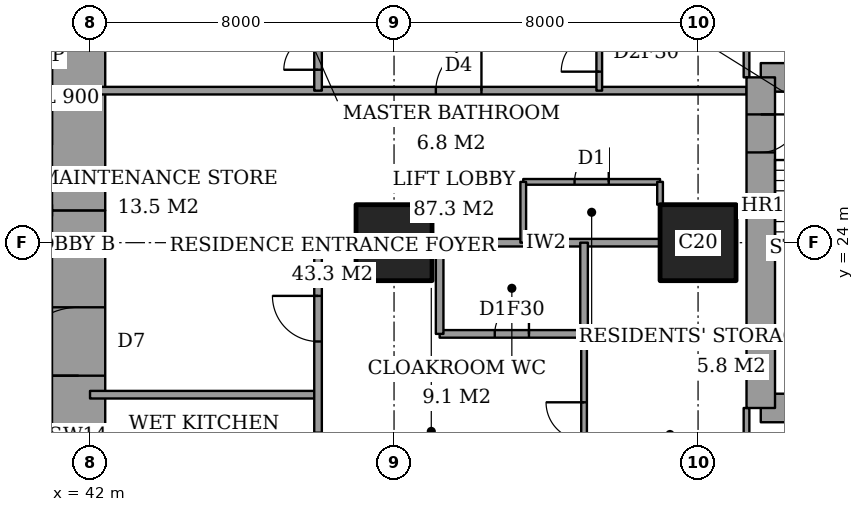
"""IFC4 building model, lengths in metres.
Left out: names, types, materials, properties, quantities, classifications, styles, units other than length and angle.
Written with IfcOpenShell. Run it as: python <this file> out.ifc"""

import sys

from ifc_helpers import new_model, si_unit, direction, frame, frame_2d, origin, origin_2d, place, context, subcontext, project, spatial, rectangle, extrude, element, fill, save


model = new_model("IFC4")
c1 = context("Model", 3, precision=1e-05, world=origin(), true_north=direction((0.0, 1.0)))
c2 = subcontext(c1, "Body", "Model", "MODEL_VIEW")
j1 = project(units=[si_unit("LENGTHUNIT", "METRE"), si_unit("PLANEANGLEUNIT", "RADIAN")], contexts=[c1])
p1 = place(None, origin())
s1 = spatial("IfcSite", under=j1, at=p1, CompositionType="ELEMENT")
p2 = place(p1, origin())
s2 = spatial("IfcBuilding", under=s1, at=p2, CompositionType="ELEMENT")
p3 = place(p2, frame((0.0, 0.0, 58.4)))
s3 = spatial("IfcBuildingStorey", under=s2, at=p3, CompositionType="ELEMENT", Elevation=58.4)
for number, where, z_axis, x_axis in (
    (1, (50.0, 24.0, 0.0), (0.0, 0.0, 1.0), (1.0, 0.0, 0.0)),
    (2, (58.0, 24.0, 0.0), (0.0, 0.0, 1.0), (1.0, 0.0, 0.0)),
):
    element("IfcColumn", number, at=place(p3, frame(where, z_axis=z_axis, x_axis=x_axis)), inside=s3, PredefinedType="COLUMN", context=c2, shape_type="SweptSolid", body=[
        extrude(rectangle(XDim=2.0, YDim=2.0, at=origin_2d()), origin(), (0.0, 0.0, 1.0), 3.6),
    ])
p4 = place(p3, frame((41.7, 13.0, 0.0), z_axis=(0.0, 0.0, 1.0), x_axis=(0.0, 1.0, 0.0)))
e3 = element("IfcWall", 3, at=p4, inside=s3, PredefinedType="SHEAR", context=c2, shape_type="SweptSolid", body=[
    extrude(rectangle(XDim=11.85, YDim=1.4, at=frame_2d((5.925, 0.0))), origin(), (0.0, 0.0, 1.0), 3.6),
])
p5 = place(p4, frame((7.5, 0.0, 0.0)))
e4 = element("IfcOpeningElement", 4, at=p5, cuts=e3, PredefinedType="OPENING", context=c2, shape_type="SweptSolid", body=[
    extrude(rectangle(XDim=1.8, YDim=2.4, at=frame_2d((0.9, 1.2))), frame((0.0, 0.71, 0.0), z_axis=(0.0, -1.0, 0.0), x_axis=(1.0, 0.0, 0.0)), (0.0, 0.0, 1.0), 1.42),
])
p6 = place(p3, frame((41.7, 24.85, 0.0), z_axis=(0.0, 0.0, 1.0), x_axis=(0.0, 1.0, 0.0)))
e5 = element("IfcWall", 5, at=p6, inside=s3, PredefinedType="SHEAR", context=c2, shape_type="SweptSolid", body=[
    extrude(rectangle(XDim=10.15, YDim=1.4, at=frame_2d((5.075, 0.0))), origin(), (0.0, 0.0, 1.0), 3.6),
])
for number, where, z_axis, x_axis in (
    (6, (59.65, 19.65, 0.0), (0.0, 0.0, 1.0), (1.0, 0.0, 0.0)),
    (7, (64.1, 28.35, 0.0), (0.0, 0.0, 1.0), (-1.0, 0.0, 0.0)),
):
    element("IfcWall", number, at=place(p3, frame(where, z_axis=z_axis, x_axis=x_axis)), inside=s3, PredefinedType="SHEAR", context=c2, shape_type="SweptSolid", body=[
        extrude(rectangle(XDim=4.45, YDim=0.75, at=frame_2d((2.225, 0.0))), origin(), (0.0, 0.0, 1.0), 3.6),
    ])
p7 = place(p3, frame((59.65, 28.35, 0.0), z_axis=(0.0, 0.0, 1.0), x_axis=(0.0, -1.0, 0.0)))
e8 = element("IfcWall", 8, at=p7, inside=s3, PredefinedType="SHEAR", context=c2, shape_type="SweptSolid", body=[
    extrude(rectangle(XDim=8.7, YDim=0.75, at=frame_2d((4.35, 0.0))), origin(), (0.0, 0.0, 1.0), 3.6),
])
p8 = place(p7, frame((0.975, 0.0, 0.0)))
e9 = element("IfcOpeningElement", 9, at=p8, cuts=e8, PredefinedType="OPENING", context=c2, shape_type="SweptSolid", body=[
    extrude(rectangle(XDim=1.0, YDim=2.1, at=frame_2d((0.5, 1.05))), frame((0.0, 0.385, 0.0), z_axis=(0.0, -1.0, 0.0), x_axis=(1.0, 0.0, 0.0)), (0.0, 0.0, 1.0), 0.77),
])
p9 = place(p3, frame((42.0, 20.0, 0.0), z_axis=(0.0, 0.0, 1.0), x_axis=(1.0, 0.0, 0.0)))
e10 = element("IfcWall", 10, at=p9, inside=s3, PredefinedType="PARTITIONING", context=c2, shape_type="SweptSolid", body=[
    extrude(rectangle(XDim=6.0, YDim=0.2, at=frame_2d((3.0, 0.0))), origin(), (0.0, 0.0, 1.0), 3.35),
])
p10 = place(p3, frame((51.2, 21.6, 0.0), z_axis=(0.0, 0.0, 1.0), x_axis=(1.0, 0.0, 0.0)))
e11 = element("IfcWall", 11, at=p10, inside=s3, PredefinedType="PARTITIONING", context=c2, shape_type="SweptSolid", body=[
    extrude(rectangle(XDim=3.8, YDim=0.2, at=frame_2d((1.9, 0.0))), origin(), (0.0, 0.0, 1.0), 3.35),
])
p11 = place(p10, frame((1.45, 0.0, 0.0)))
e12 = element("IfcOpeningElement", 12, at=p11, cuts=e11, PredefinedType="OPENING", context=c2, shape_type="SweptSolid", body=[
    extrude(rectangle(XDim=0.9, YDim=2.1, at=frame_2d((0.45, 1.05))), frame((0.0, 0.11, 0.0), z_axis=(0.0, -1.0, 0.0), x_axis=(1.0, 0.0, 0.0)), (0.0, 0.0, 1.0), 0.22),
])
p12 = place(p3, frame((48.0, 24.0, 0.0), z_axis=(0.0, 0.0, 1.0), x_axis=(1.0, 0.0, 0.0)))
e13 = element("IfcWall", 13, at=p12, inside=s3, PredefinedType="PARTITIONING", context=c2, shape_type="SweptSolid", body=[
    extrude(rectangle(XDim=1.0, YDim=0.2, at=frame_2d((0.5, 0.0))), origin(), (0.0, 0.0, 1.0), 3.35),
])
p13 = place(p3, frame((51.0, 24.0, 0.0), z_axis=(0.0, 0.0, 1.0), x_axis=(1.0, 0.0, 0.0)))
e14 = element("IfcWall", 14, at=p13, inside=s3, PredefinedType="PARTITIONING", context=c2, shape_type="SweptSolid", body=[
    extrude(rectangle(XDim=6.0, YDim=0.2, at=frame_2d((3.0, 0.0))), origin(), (0.0, 0.0, 1.0), 3.35),
])
p14 = place(p3, frame((53.4, 25.6, 0.0), z_axis=(0.0, 0.0, 1.0), x_axis=(1.0, 0.0, 0.0)))
e15 = element("IfcWall", 15, at=p14, inside=s3, PredefinedType="PARTITIONING", context=c2, shape_type="SweptSolid", body=[
    extrude(rectangle(XDim=3.6, YDim=0.15, at=frame_2d((1.8, 0.0))), origin(), (0.0, 0.0, 1.0), 3.35),
])
p15 = place(p14, frame((1.35, 0.0, 0.0)))
e16 = element("IfcOpeningElement", 16, at=p15, cuts=e15, PredefinedType="OPENING", context=c2, shape_type="SweptSolid", body=[
    extrude(rectangle(XDim=0.9, YDim=2.1, at=frame_2d((0.45, 1.05))), frame((0.0, 0.085, 0.0), z_axis=(0.0, -1.0, 0.0), x_axis=(1.0, 0.0, 0.0)), (0.0, 0.0, 1.0), 0.17),
])
p16 = place(p3, frame((42.0, 28.0, 0.0), z_axis=(0.0, 0.0, 1.0), x_axis=(1.0, 0.0, 0.0)))
e17 = element("IfcWall", 17, at=p16, inside=s3, PredefinedType="PARTITIONING", context=c2, shape_type="SweptSolid", body=[
    extrude(rectangle(XDim=17.275, YDim=0.2, at=frame_2d((8.637, 0.0))), origin(), (0.0, 0.0, 1.0), 3.35),
])
p17 = place(p16, frame((9.1, 0.0, 0.0)))
e18 = element("IfcOpeningElement", 18, at=p17, cuts=e17, PredefinedType="OPENING", context=c2, shape_type="SweptSolid", body=[
    extrude(rectangle(XDim=1.2, YDim=2.4, at=frame_2d((0.6, 1.2))), frame((0.0, 0.11, 0.0), z_axis=(0.0, -1.0, 0.0), x_axis=(1.0, 0.0, 0.0)), (0.0, 0.0, 1.0), 0.22),
])
p18 = place(p3, frame((48.0, 17.0, 0.0), z_axis=(0.0, 0.0, 1.0), x_axis=(0.0, 1.0, 0.0)))
e19 = element("IfcWall", 19, at=p18, inside=s3, PredefinedType="PARTITIONING", context=c2, shape_type="SweptSolid", body=[
    extrude(rectangle(XDim=7.0, YDim=0.2, at=frame_2d((3.5, 0.0))), origin(), (0.0, 0.0, 1.0), 3.35),
])
p19 = place(p18, frame((4.4, 0.0, 0.0)))
e20 = element("IfcOpeningElement", 20, at=p19, cuts=e19, PredefinedType="OPENING", context=c2, shape_type="SweptSolid", body=[
    extrude(rectangle(XDim=1.2, YDim=2.4, at=frame_2d((0.6, 1.2))), frame((0.0, 0.11, 0.0), z_axis=(0.0, -1.0, 0.0), x_axis=(1.0, 0.0, 0.0)), (0.0, 0.0, 1.0), 0.22),
])
p20 = place(p18, frame((1.0, 0.0, 0.0)))
e21 = element("IfcOpeningElement", 21, at=p20, cuts=e19, PredefinedType="OPENING", context=c2, shape_type="SweptSolid", body=[
    extrude(rectangle(XDim=1.0, YDim=2.1, at=frame_2d((0.5, 1.05))), frame((0.0, 0.11, 0.0), z_axis=(0.0, -1.0, 0.0), x_axis=(1.0, 0.0, 0.0)), (0.0, 0.0, 1.0), 0.22),
])
p21 = place(p3, frame((48.0, 28.0, 0.0), z_axis=(0.0, 0.0, 1.0), x_axis=(0.0, 1.0, 0.0)))
e22 = element("IfcWall", 22, at=p21, inside=s3, PredefinedType="PARTITIONING", context=c2, shape_type="SweptSolid", body=[
    extrude(rectangle(XDim=2.5, YDim=0.2, at=frame_2d((1.25, 0.0))), origin(), (0.0, 0.0, 1.0), 3.35),
])
p22 = place(p21, frame((0.55, 0.0, 0.0)))
e23 = element("IfcOpeningElement", 23, at=p22, cuts=e22, PredefinedType="OPENING", context=c2, shape_type="SweptSolid", body=[
    extrude(rectangle(XDim=0.9, YDim=2.1, at=frame_2d((0.45, 1.05))), frame((0.0, 0.11, 0.0), z_axis=(0.0, -1.0, 0.0), x_axis=(1.0, 0.0, 0.0)), (0.0, 0.0, 1.0), 0.22),
])
p23 = place(p3, frame((51.2, 21.6, 0.0), z_axis=(0.0, 0.0, 1.0), x_axis=(0.0, 1.0, 0.0)))
e24 = element("IfcWall", 24, at=p23, inside=s3, PredefinedType="PARTITIONING", context=c2, shape_type="SweptSolid", body=[
    extrude(rectangle(XDim=2.4, YDim=0.2, at=frame_2d((1.2, 0.0))), origin(), (0.0, 0.0, 1.0), 3.35),
])
p24 = place(p3, frame((53.4, 24.0, 0.0), z_axis=(0.0, 0.0, 1.0), x_axis=(0.0, 1.0, 0.0)))
e25 = element("IfcWall", 25, at=p24, inside=s3, PredefinedType="PARTITIONING", context=c2, shape_type="SweptSolid", body=[
    extrude(rectangle(XDim=1.6, YDim=0.15, at=frame_2d((0.8, 0.0))), origin(), (0.0, 0.0, 1.0), 3.35),
])
p25 = place(p3, frame((55.0, 21.6, 0.0), z_axis=(0.0, 0.0, 1.0), x_axis=(0.0, 1.0, 0.0)))
e26 = element("IfcWall", 26, at=p25, inside=s3, PredefinedType="PARTITIONING", context=c2, shape_type="SweptSolid", body=[
    extrude(rectangle(XDim=2.4, YDim=0.2, at=frame_2d((1.2, 0.0))), origin(), (0.0, 0.0, 1.0), 3.35),
])
p26 = place(p3, frame((55.0, 10.6, 0.0), z_axis=(0.0, 0.0, 1.0), x_axis=(0.0, 1.0, 0.0)))
e27 = element("IfcWall", 27, at=p26, inside=s3, PredefinedType="PARTITIONING", context=c2, shape_type="SweptSolid", body=[
    extrude(rectangle(XDim=11.0, YDim=0.15, at=frame_2d((5.5, 0.0))), origin(), (0.0, 0.0, 1.0), 3.35),
])
p27 = place(p26, frame((8.2, 0.0, 0.0)))
e28 = element("IfcOpeningElement", 28, at=p27, cuts=e27, PredefinedType="OPENING", context=c2, shape_type="SweptSolid", body=[
    extrude(rectangle(XDim=1.0, YDim=2.1, at=frame_2d((0.5, 1.05))), frame((0.0, 0.085, 0.0), z_axis=(0.0, -1.0, 0.0), x_axis=(1.0, 0.0, 0.0)), (0.0, 0.0, 1.0), 0.17),
])
p28 = place(p3, frame((55.4, 28.0, 0.0), z_axis=(0.0, 0.0, 1.0), x_axis=(0.0, 1.0, 0.0)))
e29 = element("IfcWall", 29, at=p28, inside=s3, PredefinedType="PARTITIONING", context=c2, shape_type="SweptSolid", body=[
    extrude(rectangle(XDim=9.2, YDim=0.15, at=frame_2d((4.6, 0.0))), origin(), (0.0, 0.0, 1.0), 3.35),
])
p29 = place(p28, frame((0.5, 0.0, 0.0)))
e30 = element("IfcOpeningElement", 30, at=p29, cuts=e29, PredefinedType="OPENING", context=c2, shape_type="SweptSolid", body=[
    extrude(rectangle(XDim=1.0, YDim=2.1, at=frame_2d((0.5, 1.05))), frame((0.0, 0.085, 0.0), z_axis=(0.0, -1.0, 0.0), x_axis=(1.0, 0.0, 0.0)), (0.0, 0.0, 1.0), 0.17),
])
p30 = place(p3, frame((57.0, 25.0, 0.0), z_axis=(0.0, 0.0, 1.0), x_axis=(0.0, 1.0, 0.0)))
e31 = element("IfcWall", 31, at=p30, inside=s3, PredefinedType="PARTITIONING", context=c2, shape_type="SweptSolid", body=[
    extrude(rectangle(XDim=0.6, YDim=0.15, at=frame_2d((0.3, 0.0))), origin(), (0.0, 0.0, 1.0), 3.35),
])
p31 = place(p3, frame((59.275, 17.2, 0.0), z_axis=(0.0, 0.0, 1.0), x_axis=(0.0, 1.0, 0.0)))
e32 = element("IfcWall", 32, at=p31, inside=s3, PredefinedType="PARTITIONING", context=c2, shape_type="SweptSolid", body=[
    extrude(rectangle(XDim=2.45, YDim=0.15, at=frame_2d((1.225, 0.0))), origin(), (0.0, 0.0, 1.0), 3.35),
])
p32 = place(p31, frame((0.538, 0.0, 0.0)))
e33 = element("IfcOpeningElement", 33, at=p32, cuts=e32, PredefinedType="OPENING", context=c2, shape_type="SweptSolid", body=[
    extrude(rectangle(XDim=1.0, YDim=2.1, at=frame_2d((0.5, 1.05))), frame((0.0, 0.085, 0.0), z_axis=(0.0, -1.0, 0.0), x_axis=(1.0, 0.0, 0.0)), (0.0, 0.0, 1.0), 0.17),
])
p33 = place(p3, frame((59.275, 28.35, 0.0), z_axis=(0.0, 0.0, 1.0), x_axis=(0.0, 1.0, 0.0)))
e34 = element("IfcWall", 34, at=p33, inside=s3, PredefinedType="PARTITIONING", context=c2, shape_type="SweptSolid", body=[
    extrude(rectangle(XDim=2.45, YDim=0.15, at=frame_2d((1.225, 0.0))), origin(), (0.0, 0.0, 1.0), 3.35),
])
p34 = place(p33, frame((0.962, 0.0, 0.0)))
e35 = element("IfcOpeningElement", 35, at=p34, cuts=e34, PredefinedType="OPENING", context=c2, shape_type="SweptSolid", body=[
    extrude(rectangle(XDim=0.9, YDim=2.1, at=frame_2d((0.45, 1.05))), frame((0.0, 0.085, 0.0), z_axis=(0.0, -1.0, 0.0), x_axis=(1.0, 0.0, 0.0)), (0.0, 0.0, 1.0), 0.17),
])
p35 = place(p27, origin())
e36 = element("IfcDoor", 36, at=p35, inside=s3, OperationType="SINGLE_SWING_LEFT", PredefinedType="DOOR", context=c2, shape_type="SweptSolid", body=[
    extrude(rectangle(XDim=1.0, YDim=2.1, at=frame_2d((0.5, 1.05))), frame((0.0, 0.025, 0.0), z_axis=(0.0, -1.0, 0.0), x_axis=(1.0, 0.0, 0.0)), (0.0, 0.0, 1.0), 0.05),
])
fill(e28, e36)
p36 = place(p11, origin())
e37 = element("IfcDoor", 37, at=p36, inside=s3, OperationType="SINGLE_SWING_LEFT", PredefinedType="DOOR", context=c2, shape_type="SweptSolid", body=[
    extrude(rectangle(XDim=0.9, YDim=2.1, at=frame_2d((0.45, 1.05))), frame((0.0, 0.025, 0.0), z_axis=(0.0, -1.0, 0.0), x_axis=(1.0, 0.0, 0.0)), (0.0, 0.0, 1.0), 0.05),
])
fill(e12, e37)
p37 = place(p19, origin())
e38 = element("IfcDoor", 38, at=p37, inside=s3, OperationType="SINGLE_SWING_LEFT", PredefinedType="DOOR", context=c2, shape_type="SweptSolid", body=[
    extrude(rectangle(XDim=1.2, YDim=2.4, at=frame_2d((0.6, 1.2))), frame((0.0, 0.025, 0.0), z_axis=(0.0, -1.0, 0.0), x_axis=(1.0, 0.0, 0.0)), (0.0, 0.0, 1.0), 0.05),
])
fill(e20, e38)
p38 = place(p29, origin())
e39 = element("IfcDoor", 39, at=p38, inside=s3, OperationType="SINGLE_SWING_RIGHT", PredefinedType="DOOR", context=c2, shape_type="SweptSolid", body=[
    extrude(rectangle(XDim=1.0, YDim=2.1, at=frame_2d((0.5, 1.05))), frame((0.0, 0.025, 0.0), z_axis=(0.0, -1.0, 0.0), x_axis=(1.0, 0.0, 0.0)), (0.0, 0.0, 1.0), 0.05),
])
fill(e30, e39)
p39 = place(p17, origin())
e40 = element("IfcDoor", 40, at=p39, inside=s3, OperationType="SINGLE_SWING_LEFT", PredefinedType="DOOR", context=c2, shape_type="SweptSolid", body=[
    extrude(rectangle(XDim=1.2, YDim=2.4, at=frame_2d((0.6, 1.2))), frame((0.0, 0.025, 0.0), z_axis=(0.0, -1.0, 0.0), x_axis=(1.0, 0.0, 0.0)), (0.0, 0.0, 1.0), 0.05),
])
fill(e18, e40)
p40 = place(p22, origin())
e41 = element("IfcDoor", 41, at=p40, inside=s3, OperationType="SINGLE_SWING_RIGHT", PredefinedType="DOOR", context=c2, shape_type="SweptSolid", body=[
    extrude(rectangle(XDim=0.9, YDim=2.1, at=frame_2d((0.45, 1.05))), frame((0.0, 0.025, 0.0), z_axis=(0.0, -1.0, 0.0), x_axis=(1.0, 0.0, 0.0)), (0.0, 0.0, 1.0), 0.05),
])
fill(e23, e41)
p41 = place(p15, origin())
e42 = element("IfcDoor", 42, at=p41, inside=s3, OperationType="SINGLE_SWING_LEFT", PredefinedType="DOOR", context=c2, shape_type="SweptSolid", body=[
    extrude(rectangle(XDim=0.9, YDim=2.1, at=frame_2d((0.45, 1.05))), frame((0.0, 0.025, 0.0), z_axis=(0.0, -1.0, 0.0), x_axis=(1.0, 0.0, 0.0)), (0.0, 0.0, 1.0), 0.05),
])
fill(e16, e42)
p42 = place(p5, origin())
e43 = element("IfcDoor", 43, at=p42, inside=s3, OperationType="DOUBLE_DOOR_DOUBLE_SWING", PredefinedType="DOOR", context=c2, shape_type="SweptSolid", body=[
    extrude(rectangle(XDim=1.8, YDim=2.4, at=frame_2d((0.9, 1.2))), frame((0.0, 0.025, 0.0), z_axis=(0.0, -1.0, 0.0), x_axis=(1.0, 0.0, 0.0)), (0.0, 0.0, 1.0), 0.05),
])
fill(e4, e43)
p43 = place(p8, origin())
e44 = element("IfcDoor", 44, at=p43, inside=s3, OperationType="SINGLE_SWING_RIGHT", PredefinedType="DOOR", context=c2, shape_type="SweptSolid", body=[
    extrude(rectangle(XDim=1.0, YDim=2.1, at=frame_2d((0.5, 1.05))), frame((0.0, 0.025, 0.0), z_axis=(0.0, -1.0, 0.0), x_axis=(1.0, 0.0, 0.0)), (0.0, 0.0, 1.0), 0.05),
])
fill(e9, e44)
save(model, sys.argv[1])
